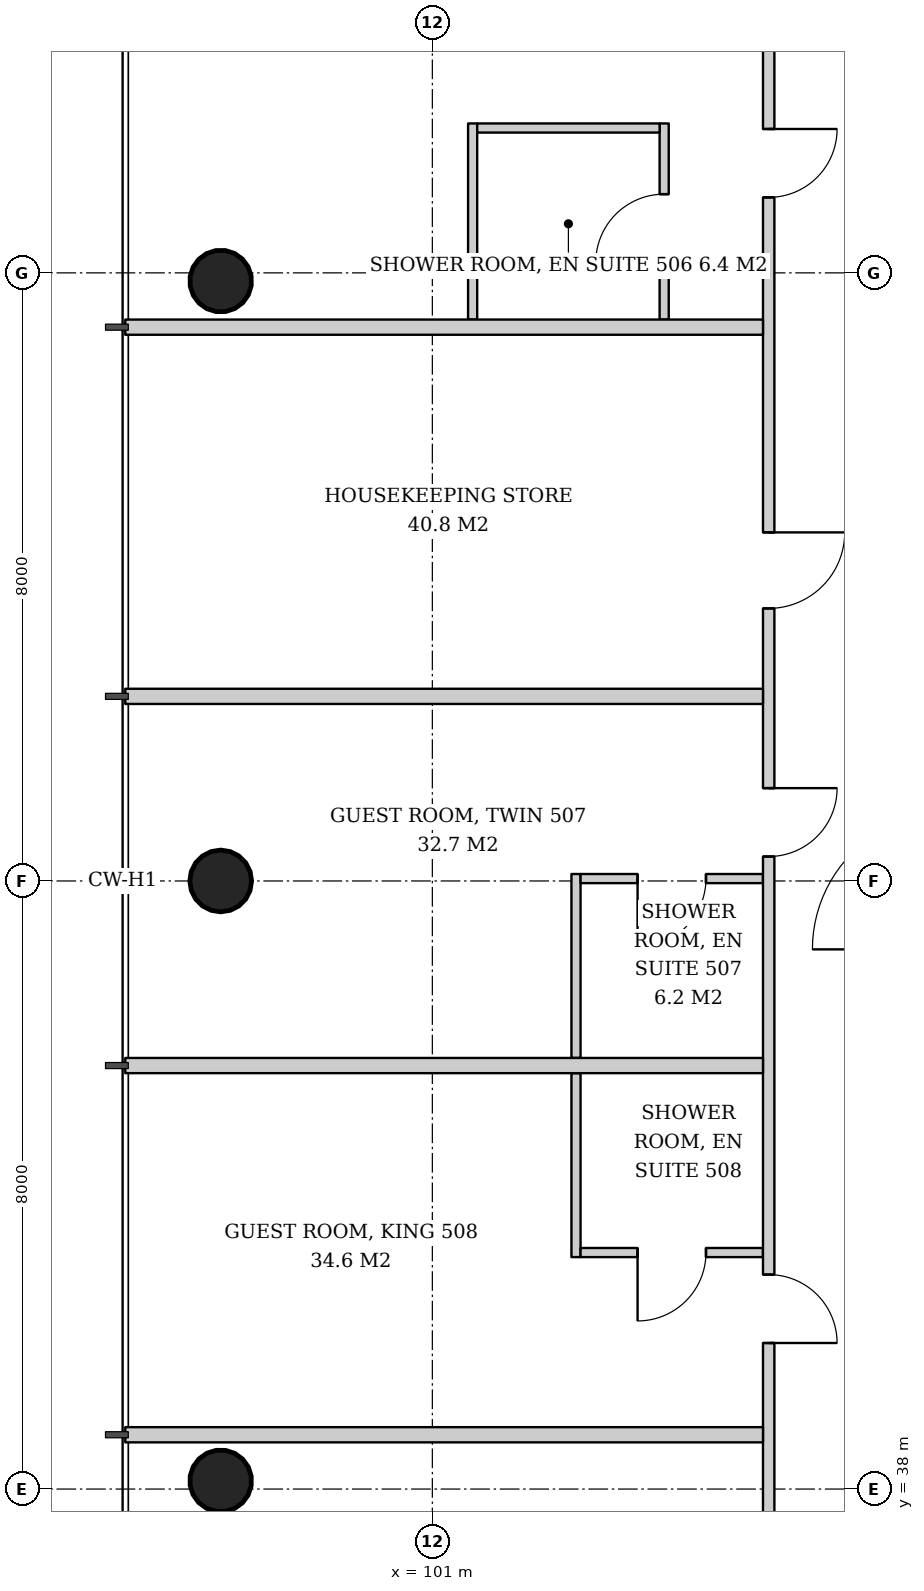
"""IFC4 building model, lengths in metres.
Left out: names, types, materials, properties, quantities, classifications, styles, units other than length and angle.
Written with IfcOpenShell. Run it as: python <this file> out.ifc"""

import sys

from ifc_helpers import new_model, si_unit, direction, frame, frame_2d, origin, origin_2d, place, context, subcontext, project, spatial, rectangle, hollow_circle, extrude, element, fill, save


model = new_model("IFC4")
c1 = context("Model", 3, precision=1e-05, world=origin(), true_north=direction((0.0, 1.0)))
c2 = subcontext(c1, "Body", "Model", "MODEL_VIEW")
j1 = project(units=[si_unit("LENGTHUNIT", "METRE"), si_unit("PLANEANGLEUNIT", "RADIAN")], contexts=[c1])
p1 = place(None, origin())
s1 = spatial("IfcSite", under=j1, at=p1, CompositionType="ELEMENT")
p2 = place(p1, origin())
s2 = spatial("IfcBuilding", under=s1, at=p2, CompositionType="ELEMENT")
p3 = place(p2, frame((0.0, 0.0, 24.8)))
s3 = spatial("IfcBuildingStorey", under=s2, at=p3, CompositionType="ELEMENT", Elevation=24.8)
p4 = place(p3, frame((98.164, 53.918, 0.0), z_axis=(0.043059525333, -0.021561848751, 0.998839808957), x_axis=(0.44774654769, 0.894160516368, 0.0)))
e1 = element("IfcColumn", 1, at=p4, inside=s3, PredefinedType="COLUMN", context=c2, shape_type="SweptSolid", body=[
    extrude(hollow_circle(Radius=0.406, WallThickness=0.03, at=origin_2d()), origin(), (0.0, 0.0, 1.0), 3.804),
])
p5 = place(p3, frame((98.164, 46.0, 0.0), z_axis=(0.043069538298, 0.0, 0.999072076915), x_axis=(0.0, 1.0, 0.0)))
e2 = element("IfcColumn", 2, at=p5, inside=s3, PredefinedType="COLUMN", context=c2, shape_type="SweptSolid", body=[
    extrude(hollow_circle(Radius=0.406, WallThickness=0.03, at=origin_2d()), origin(), (0.0, 0.0, 1.0), 3.803),
])
p6 = place(p3, frame((98.164, 38.082, 0.0), z_axis=(0.043059525333, 0.021561848751, 0.998839808957), x_axis=(-0.44774654769, 0.894160516368, 0.0)))
e3 = element("IfcColumn", 3, at=p6, inside=s3, PredefinedType="COLUMN", context=c2, shape_type="SweptSolid", body=[
    extrude(hollow_circle(Radius=0.406, WallThickness=0.03, at=origin_2d()), origin(), (0.0, 0.0, 1.0), 3.804),
])
p7 = place(p3, frame((104.05, 53.386, 0.0), z_axis=(0.0, 0.0, 1.0), x_axis=(0.0, 1.0, 0.0)))
e4 = element("IfcWall", 4, at=p7, inside=s3, PredefinedType="PARTITIONING", context=c2, shape_type="SweptSolid", body=[
    extrude(rectangle(XDim=2.58, YDim=0.12, at=frame_2d((1.29, 0.0))), origin(), (0.0, 0.0, 1.0), 2.8),
])
p8 = place(p7, frame((0.75, 0.0, 0.0)))
e5 = element("IfcOpeningElement", 5, at=p8, cuts=e4, PredefinedType="OPENING", context=c2, shape_type="SweptSolid", body=[
    extrude(rectangle(XDim=0.9, YDim=2.1, at=frame_2d((0.45, 1.05))), frame((0.0, 0.07, 0.0), z_axis=(0.0, -1.0, 0.0), x_axis=(1.0, 0.0, 0.0)), (0.0, 0.0, 1.0), 0.14),
])
p9 = place(p3, frame((101.53, 53.386, 0.0), z_axis=(0.0, 0.0, 1.0), x_axis=(0.0, 1.0, 0.0)))
e6 = element("IfcWall", 6, at=p9, inside=s3, PredefinedType="PARTITIONING", context=c2, shape_type="SweptSolid", body=[
    extrude(rectangle(XDim=2.58, YDim=0.12, at=frame_2d((1.29, 0.0))), origin(), (0.0, 0.0, 1.0), 2.8),
])
p10 = place(p3, frame((103.99, 55.906, 0.0), z_axis=(0.0, 0.0, 1.0), x_axis=(-1.0, 0.0, 0.0)))
e7 = element("IfcWall", 7, at=p10, inside=s3, PredefinedType="PARTITIONING", context=c2, shape_type="SweptSolid", body=[
    extrude(rectangle(XDim=2.4, YDim=0.12, at=frame_2d((1.2, 0.0))), origin(), (0.0, 0.0, 1.0), 2.847),
])
p11 = place(p3, frame((102.89, 46.091, 0.0), z_axis=(0.0, 0.0, 1.0), x_axis=(0.0, -1.0, 0.0)))
e8 = element("IfcWall", 8, at=p11, inside=s3, PredefinedType="PARTITIONING", context=c2, shape_type="SweptSolid", body=[
    extrude(rectangle(XDim=2.42, YDim=0.12, at=frame_2d((1.21, 0.0))), origin(), (0.0, 0.0, 1.0), 3.6),
])
p12 = place(p3, frame((105.35, 46.031, 0.0), z_axis=(0.0, 0.0, 1.0), x_axis=(-1.0, 0.0, 0.0)))
e9 = element("IfcWall", 9, at=p12, inside=s3, PredefinedType="PARTITIONING", context=c2, shape_type="SweptSolid", body=[
    extrude(rectangle(XDim=2.4, YDim=0.12, at=frame_2d((1.2, 0.0))), origin(), (0.0, 0.0, 1.0), 3.6),
])
p13 = place(p12, frame((0.75, 0.0, 0.0)))
e10 = element("IfcOpeningElement", 10, at=p13, cuts=e9, PredefinedType="OPENING", context=c2, shape_type="SweptSolid", body=[
    extrude(rectangle(XDim=0.9, YDim=2.1, at=frame_2d((0.45, 1.05))), frame((0.0, 0.07, 0.0), z_axis=(0.0, -1.0, 0.0), x_axis=(1.0, 0.0, 0.0)), (0.0, 0.0, 1.0), 0.14),
])
p14 = place(p3, frame((102.89, 43.471, 0.0), z_axis=(0.0, 0.0, 1.0), x_axis=(0.0, -1.0, 0.0)))
e11 = element("IfcWall", 11, at=p14, inside=s3, PredefinedType="PARTITIONING", context=c2, shape_type="SweptSolid", body=[
    extrude(rectangle(XDim=2.42, YDim=0.12, at=frame_2d((1.21, 0.0))), origin(), (0.0, 0.0, 1.0), 2.847),
])
p15 = place(p3, frame((105.35, 41.111, 0.0), z_axis=(0.0, 0.0, 1.0), x_axis=(-1.0, 0.0, 0.0)))
e12 = element("IfcWall", 12, at=p15, inside=s3, PredefinedType="PARTITIONING", context=c2, shape_type="SweptSolid", body=[
    extrude(rectangle(XDim=2.4, YDim=0.12, at=frame_2d((1.2, 0.0))), origin(), (0.0, 0.0, 1.0), 3.6),
])
p16 = place(p15, frame((0.75, 0.0, 0.0)))
e13 = element("IfcOpeningElement", 13, at=p16, cuts=e12, PredefinedType="OPENING", context=c2, shape_type="SweptSolid", body=[
    extrude(rectangle(XDim=0.9, YDim=2.1, at=frame_2d((0.45, 1.05))), frame((0.0, 0.07, 0.0), z_axis=(0.0, -1.0, 0.0), x_axis=(1.0, 0.0, 0.0)), (0.0, 0.0, 1.0), 0.14),
])
p17 = place(p3, frame((105.425, 57.65, 0.0), z_axis=(0.0, 0.0, 1.0), x_axis=(0.0, -1.0, 0.0)))
e14 = element("IfcWall", 14, at=p17, inside=s3, PredefinedType="PARTITIONING", context=c2, shape_type="SweptSolid", body=[
    extrude(rectangle(XDim=23.15, YDim=0.15, at=frame_2d((11.575, 0.0))), origin(), (0.0, 0.0, 1.0), 2.8),
])
p18 = place(p17, frame((1.757, 0.0, 0.0)))
e15 = element("IfcOpeningElement", 15, at=p18, cuts=e14, PredefinedType="OPENING", context=c2, shape_type="SweptSolid", body=[
    extrude(rectangle(XDim=0.9, YDim=2.1, at=frame_2d((0.45, 1.05))), frame((0.0, 0.085, 0.0), z_axis=(0.0, -1.0, 0.0), x_axis=(1.0, 0.0, 0.0)), (0.0, 0.0, 1.0), 0.17),
])
p19 = place(p17, frame((7.064, 0.0, 0.0)))
e16 = element("IfcOpeningElement", 16, at=p19, cuts=e14, PredefinedType="OPENING", context=c2, shape_type="SweptSolid", body=[
    extrude(rectangle(XDim=1.0, YDim=2.1, at=frame_2d((0.5, 1.05))), frame((0.0, 0.085, 0.0), z_axis=(0.0, -1.0, 0.0), x_axis=(1.0, 0.0, 0.0)), (0.0, 0.0, 1.0), 0.17),
])
p20 = place(p17, frame((10.428, 0.0, 0.0)))
e17 = element("IfcOpeningElement", 17, at=p20, cuts=e14, PredefinedType="OPENING", context=c2, shape_type="SweptSolid", body=[
    extrude(rectangle(XDim=0.9, YDim=2.1, at=frame_2d((0.45, 1.05))), frame((0.0, 0.085, 0.0), z_axis=(0.0, -1.0, 0.0), x_axis=(1.0, 0.0, 0.0)), (0.0, 0.0, 1.0), 0.17),
])
p21 = place(p17, frame((16.829, 0.0, 0.0)))
e18 = element("IfcOpeningElement", 18, at=p21, cuts=e14, PredefinedType="OPENING", context=c2, shape_type="SweptSolid", body=[
    extrude(rectangle(XDim=0.9, YDim=2.1, at=frame_2d((0.45, 1.05))), frame((0.0, 0.085, 0.0), z_axis=(0.0, -1.0, 0.0), x_axis=(1.0, 0.0, 0.0)), (0.0, 0.0, 1.0), 0.17),
])
for number, where, z_axis, x_axis in (
    (19, (105.35, 53.286, 0.0), (0.0, 0.0, 1.0), (-1.0, 0.0, 0.0)),
    (20, (105.35, 48.428, 0.0), (0.0, 0.0, 1.0), (-1.0, 0.0, 0.0)),
    (21, (105.35, 43.572, 0.0), (0.0, 0.0, 1.0), (-1.0, 0.0, 0.0)),
    (22, (105.35, 38.714, 0.0), (0.0, 0.0, 1.0), (-1.0, 0.0, 0.0)),
):
    element("IfcWall", number, at=place(p3, frame(where, z_axis=z_axis, x_axis=x_axis)), inside=s3, PredefinedType="PARTITIONING", context=c2, shape_type="SweptSolid", body=[
        extrude(rectangle(XDim=8.39, YDim=0.2, at=frame_2d((4.195, 0.0))), origin(), (0.0, 0.0, 1.0), 3.05),
    ])
p22 = place(p8, origin())
e23 = element("IfcDoor", 23, at=p22, inside=s3, OperationType="SINGLE_SWING_LEFT", PredefinedType="DOOR", context=c2, shape_type="SweptSolid", body=[
    extrude(rectangle(XDim=0.9, YDim=2.1, at=frame_2d((0.45, 1.05))), frame((0.0, 0.025, 0.0), z_axis=(0.0, -1.0, 0.0), x_axis=(1.0, 0.0, 0.0)), (0.0, 0.0, 1.0), 0.05),
])
fill(e5, e23)
p23 = place(p13, origin())
e24 = element("IfcDoor", 24, at=p23, inside=s3, OperationType="SINGLE_SWING_RIGHT", PredefinedType="DOOR", context=c2, shape_type="SweptSolid", body=[
    extrude(rectangle(XDim=0.9, YDim=2.1, at=frame_2d((0.45, 1.05))), frame((0.0, 0.025, 0.0), z_axis=(0.0, -1.0, 0.0), x_axis=(1.0, 0.0, 0.0)), (0.0, 0.0, 1.0), 0.05),
])
fill(e10, e24)
p24 = place(p16, origin())
e25 = element("IfcDoor", 25, at=p24, inside=s3, OperationType="SINGLE_SWING_RIGHT", PredefinedType="DOOR", context=c2, shape_type="SweptSolid", body=[
    extrude(rectangle(XDim=0.9, YDim=2.1, at=frame_2d((0.45, 1.05))), frame((0.0, 0.025, 0.0), z_axis=(0.0, -1.0, 0.0), x_axis=(1.0, 0.0, 0.0)), (0.0, 0.0, 1.0), 0.05),
])
fill(e13, e25)
p25 = place(p18, origin())
e26 = element("IfcDoor", 26, at=p25, inside=s3, OperationType="SINGLE_SWING_LEFT", PredefinedType="DOOR", context=c2, shape_type="SweptSolid", body=[
    extrude(rectangle(XDim=0.9, YDim=2.1, at=frame_2d((0.45, 1.05))), frame((0.0, 0.025, 0.0), z_axis=(0.0, -1.0, 0.0), x_axis=(1.0, 0.0, 0.0)), (0.0, 0.0, 1.0), 0.05),
])
fill(e15, e26)
p26 = place(p19, origin())
e27 = element("IfcDoor", 27, at=p26, inside=s3, OperationType="SINGLE_SWING_LEFT", PredefinedType="DOOR", context=c2, shape_type="SweptSolid", body=[
    extrude(rectangle(XDim=1.0, YDim=2.1, at=frame_2d((0.5, 1.05))), frame((0.0, 0.025, 0.0), z_axis=(0.0, -1.0, 0.0), x_axis=(1.0, 0.0, 0.0)), (0.0, 0.0, 1.0), 0.05),
])
fill(e16, e27)
p27 = place(p20, origin())
e28 = element("IfcDoor", 28, at=p27, inside=s3, OperationType="SINGLE_SWING_LEFT", PredefinedType="DOOR", context=c2, shape_type="SweptSolid", body=[
    extrude(rectangle(XDim=0.9, YDim=2.1, at=frame_2d((0.45, 1.05))), frame((0.0, 0.025, 0.0), z_axis=(0.0, -1.0, 0.0), x_axis=(1.0, 0.0, 0.0)), (0.0, 0.0, 1.0), 0.05),
])
fill(e17, e28)
p28 = place(p21, origin())
e29 = element("IfcDoor", 29, at=p28, inside=s3, OperationType="SINGLE_SWING_RIGHT", PredefinedType="DOOR", context=c2, shape_type="SweptSolid", body=[
    extrude(rectangle(XDim=0.9, YDim=2.1, at=frame_2d((0.45, 1.05))), frame((0.0, 0.025, 0.0), z_axis=(0.0, -1.0, 0.0), x_axis=(1.0, 0.0, 0.0)), (0.0, 0.0, 1.0), 0.05),
])
fill(e18, e29)
save(model, sys.argv[1])
